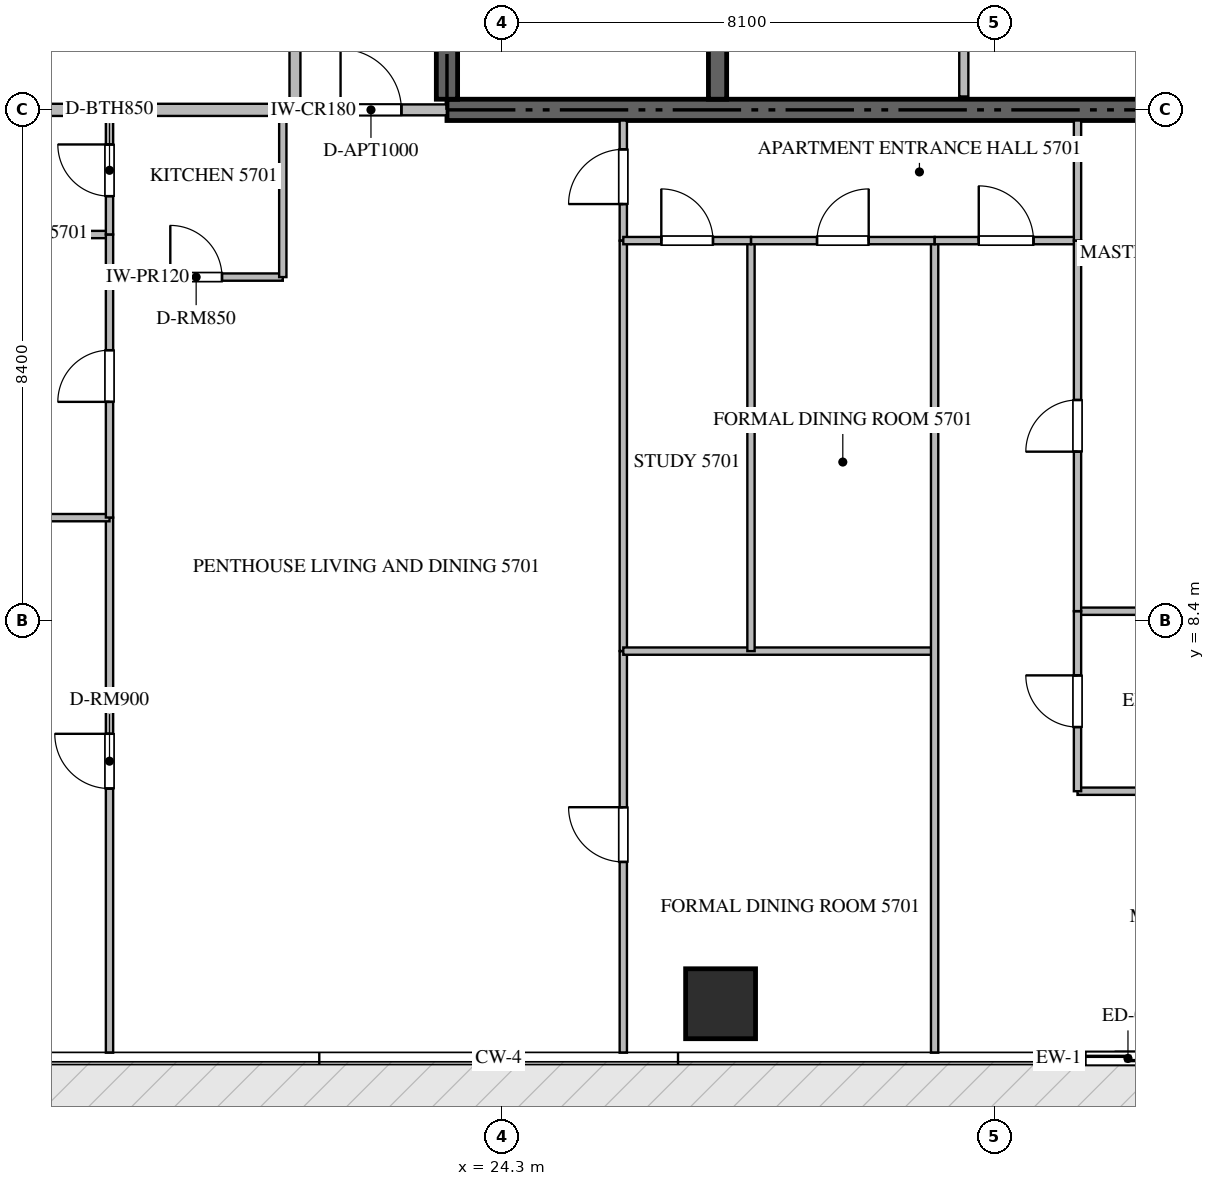
"""IFC4 building model, lengths in metres.
Left out: names, types, materials, properties, quantities, classifications, styles, units other than length and angle.
Written with IfcOpenShell. Run it as: python <this file> out.ifc"""

import sys

from ifc_helpers import new_model, si_unit, direction, frame, frame_2d, origin, origin_2d, place, context, subcontext, project, spatial, rectangle, extrude, source, transform, mapped, element, fill, save


model = new_model("IFC4")
c1 = context("Model", 3, precision=1e-05, world=origin(), true_north=direction((0.0, 1.0)))
c2 = subcontext(c1, "Body", "Model", "MODEL_VIEW")
j1 = project(units=[si_unit("LENGTHUNIT", "METRE"), si_unit("PLANEANGLEUNIT", "RADIAN")], contexts=[c1])
p1 = place(None, origin())
s1 = spatial("IfcSite", under=j1, at=p1, CompositionType="ELEMENT")
p2 = place(p1, origin())
s2 = spatial("IfcBuilding", under=s1, at=p2, CompositionType="ELEMENT")
p3 = place(p2, frame((0.0, 0.0, 229.7)))
s3 = spatial("IfcBuildingStorey", under=s2, at=p3, CompositionType="ELEMENT", Elevation=229.7)
p4 = place(p3, frame((23.4, 16.8, -0.26), z_axis=(0.0, 0.0, 1.0), x_axis=(1.0, 0.0, 0.0)))
e1 = element("IfcWall", 1, at=p4, inside=s3, PredefinedType="SHEAR", context=c2, shape_type="SweptSolid", body=[
    extrude(rectangle(XDim=18.0, YDim=0.35, at=frame_2d((9.0, 0.0))), origin(), (0.0, 0.0, 1.0), 3.848),
])
p5 = place(p3, frame((23.4, 16.975, -0.26), z_axis=(0.0, 0.0, 1.0), x_axis=(0.0, 1.0, 0.0)))
e2 = element("IfcWall", 2, at=p5, inside=s3, PredefinedType="SHEAR", context=c2, shape_type="SweptSolid", body=[
    extrude(rectangle(XDim=4.875, YDim=0.35, at=frame_2d((2.438, 0.0))), origin(), (0.0, 0.0, 1.0), 3.848),
])
p6 = place(p3, frame((27.85, 16.975, -0.26), z_axis=(0.0, 0.0, 1.0), x_axis=(0.0, 1.0, 0.0)))
e3 = element("IfcWall", 3, at=p6, inside=s3, PredefinedType="SHEAR", context=c2, shape_type="SweptSolid", body=[
    extrude(rectangle(XDim=4.875, YDim=0.3, at=frame_2d((2.438, 0.0))), origin(), (0.0, 0.0, 1.0), 3.848),
])
m1 = source(origin(), c2, "Body", "SweptSolid", [
    extrude(rectangle(XDim=1.15, YDim=1.15, at=origin_2d()), origin(), (0.0, 0.0, 1.0), 3.85),
])
p7 = place(p3, frame((27.9, 2.1, -0.26), z_axis=(0.0, 0.0, 1.0), x_axis=(1.0, 0.0, 0.0)))
e4 = element("IfcColumn", 4, at=p7, inside=s3, PredefinedType="COLUMN", context=c2, shape_type="MappedRepresentation", body=[
    mapped(m1, transform((0.0, 0.0, 0.0), scale=1.0)),
])
p8 = place(p3, frame((33.1, 1.2, 0.0), z_axis=(0.0, 0.0, 1.0), x_axis=(1.0, 0.0, 0.0)))
e5 = element("IfcWall", 5, at=p8, inside=s3, PredefinedType="ELEMENTEDWALL", context=c2, shape_type="SweptSolid", body=[
    extrude(rectangle(XDim=3.0, YDim=0.22, at=frame_2d((1.5, 0.0))), origin(), (0.0, 0.0, 1.0), 3.575),
])
p9 = place(p8, frame((0.8, 0.0, 0.0)))
e6 = element("IfcOpeningElement", 6, at=p9, cuts=e5, PredefinedType="OPENING", context=c2, shape_type="SweptSolid", body=[
    extrude(rectangle(XDim=1.4, YDim=2.25, at=frame_2d((0.7, 1.125))), frame((0.0, 0.12, 0.0), z_axis=(0.0, -1.0, 0.0), x_axis=(1.0, 0.0, 0.0)), (0.0, 0.0, 1.0), 0.24),
])
p10 = place(p3, frame((31.9, 17.02, 0.0), z_axis=(0.0, 0.0, 1.0), x_axis=(0.0, 1.0, 0.0)))
e7 = element("IfcWall", 7, at=p10, inside=s3, PredefinedType="PARTITIONING", context=c2, shape_type="SweptSolid", body=[
    extrude(rectangle(XDim=2.73, YDim=0.15, at=frame_2d((1.365, 0.0))), origin(), (0.0, 0.0, 1.0), 3.59),
])
p11 = place(p3, frame((7.482, 16.8, 0.0), z_axis=(0.0, 0.0, 1.0), x_axis=(1.0, 0.0, 0.0)))
e8 = element("IfcWall", 8, at=p11, inside=s3, PredefinedType="PARTITIONING", context=c2, shape_type="SweptSolid", body=[
    extrude(rectangle(XDim=13.418, YDim=0.2, at=frame_2d((6.709, 0.0))), origin(), (0.0, 0.0, 1.0), 3.59),
])
p12 = place(p3, frame((20.902, 16.8, 0.0), z_axis=(0.0, 0.0, 1.0), x_axis=(1.0, 0.0, 0.0)))
e9 = element("IfcWall", 9, at=p12, inside=s3, PredefinedType="PARTITIONING", context=c2, shape_type="SweptSolid", body=[
    extrude(rectangle(XDim=2.496, YDim=0.18, at=frame_2d((1.248, 0.0))), origin(), (0.0, 0.0, 1.0), 3.59),
])
p13 = place(p12, frame((0.748, 0.0, 0.0)))
e10 = element("IfcOpeningElement", 10, at=p13, cuts=e9, PredefinedType="OPENING", context=c2, shape_type="SweptSolid", body=[
    extrude(rectangle(XDim=1.0, YDim=2.15, at=frame_2d((0.5, 1.075))), frame((0.0, 0.1, 0.0), z_axis=(0.0, -1.0, 0.0), x_axis=(1.0, 0.0, 0.0)), (0.0, 0.0, 1.0), 0.2),
])
p14 = place(p3, frame((20.9, 16.8, 0.0), z_axis=(0.0, 0.0, 1.0), x_axis=(0.0, 1.0, 0.0)))
e11 = element("IfcWall", 11, at=p14, inside=s3, PredefinedType="PARTITIONING", context=c2, shape_type="SweptSolid", body=[
    extrude(rectangle(XDim=16.8, YDim=0.18, at=frame_2d((8.4, 0.0))), origin(), (0.0, 0.0, 1.0), 3.59),
])
p15 = place(p14, frame((2.465, 0.0, 0.0)))
e12 = element("IfcOpeningElement", 12, at=p15, cuts=e11, PredefinedType="OPENING", context=c2, shape_type="SweptSolid", body=[
    extrude(rectangle(XDim=1.0, YDim=2.15, at=frame_2d((0.5, 1.075))), frame((0.0, 0.1, 0.0), z_axis=(0.0, -1.0, 0.0), x_axis=(1.0, 0.0, 0.0)), (0.0, 0.0, 1.0), 0.2),
])
p16 = place(p14, frame((10.902, 0.0, 0.0)))
e13 = element("IfcOpeningElement", 13, at=p16, cuts=e11, PredefinedType="OPENING", context=c2, shape_type="SweptSolid", body=[
    extrude(rectangle(XDim=1.0, YDim=2.15, at=frame_2d((0.5, 1.075))), frame((0.0, 0.1, 0.0), z_axis=(0.0, -1.0, 0.0), x_axis=(1.0, 0.0, 0.0)), (0.0, 0.0, 1.0), 0.2),
])
p17 = place(p3, frame((17.85, 14.05, 0.0), z_axis=(0.0, 0.0, 1.0), x_axis=(1.0, 0.0, 0.0)))
e14 = element("IfcWall", 14, at=p17, inside=s3, PredefinedType="PARTITIONING", context=c2, shape_type="SweptSolid", body=[
    extrude(rectangle(XDim=2.85, YDim=0.12, at=frame_2d((1.425, 0.0))), origin(), (0.0, 0.0, 1.0), 3.59),
])
p18 = place(p17, frame((1.0, 0.0, 0.0)))
e15 = element("IfcOpeningElement", 15, at=p18, cuts=e14, PredefinedType="OPENING", context=c2, shape_type="SweptSolid", body=[
    extrude(rectangle(XDim=0.85, YDim=2.1, at=frame_2d((0.425, 1.05))), frame((0.0, 0.07, 0.0), z_axis=(0.0, -1.0, 0.0), x_axis=(1.0, 0.0, 0.0)), (0.0, 0.0, 1.0), 0.14),
])
p19 = place(p3, frame((20.7, 14.05, 0.0), z_axis=(0.0, 0.0, 1.0), x_axis=(0.0, 1.0, 0.0)))
e16 = element("IfcWall", 16, at=p19, inside=s3, PredefinedType="PARTITIONING", context=c2, shape_type="SweptSolid", body=[
    extrude(rectangle(XDim=2.81, YDim=0.12, at=frame_2d((1.405, 0.0))), origin(), (0.0, 0.0, 1.0), 3.59),
])
p20 = place(p3, frame((17.85, 1.295, 0.0), z_axis=(0.0, 0.0, 1.0), x_axis=(0.0, 1.0, 0.0)))
e17 = element("IfcWall", 17, at=p20, inside=s3, PredefinedType="PARTITIONING", context=c2, shape_type="SweptSolid", body=[
    extrude(rectangle(XDim=8.799, YDim=0.12, at=frame_2d((4.399, 0.0))), origin(), (0.0, 0.0, 1.0), 3.59),
])
p21 = place(p20, frame((4.344, 0.0, 0.0)))
e18 = element("IfcOpeningElement", 18, at=p21, cuts=e17, PredefinedType="OPENING", context=c2, shape_type="SweptSolid", body=[
    extrude(rectangle(XDim=0.9, YDim=2.1, at=frame_2d((0.45, 1.05))), frame((0.0, 0.07, 0.0), z_axis=(0.0, -1.0, 0.0), x_axis=(1.0, 0.0, 0.0)), (0.0, 0.0, 1.0), 0.14),
])
p22 = place(p3, frame((7.495, 10.094, 0.0), z_axis=(0.0, 0.0, 1.0), x_axis=(1.0, 0.0, 0.0)))
e19 = element("IfcWall", 19, at=p22, inside=s3, PredefinedType="PARTITIONING", context=c2, shape_type="SweptSolid", body=[
    extrude(rectangle(XDim=10.355, YDim=0.12, at=frame_2d((5.177, 0.0))), origin(), (0.0, 0.0, 1.0), 3.122),
])
p23 = place(p3, frame((14.65, 14.75, 0.0), z_axis=(0.0, 0.0, 1.0), x_axis=(1.0, 0.0, 0.0)))
e20 = element("IfcWall", 20, at=p23, inside=s3, PredefinedType="PARTITIONING", context=c2, shape_type="SweptSolid", body=[
    extrude(rectangle(XDim=3.2, YDim=0.12, at=frame_2d((1.6, 0.0))), origin(), (0.0, 0.0, 1.0), 3.59),
])
p24 = place(p3, frame((17.85, 10.096, 0.0), z_axis=(0.0, 0.0, 1.0), x_axis=(0.0, 1.0, 0.0)))
e21 = element("IfcWall", 21, at=p24, inside=s3, PredefinedType="PARTITIONING", context=c2, shape_type="SweptSolid", body=[
    extrude(rectangle(XDim=4.654, YDim=0.12, at=frame_2d((2.327, 0.0))), origin(), (0.0, 0.0, 1.0), 3.59),
])
p25 = place(p24, frame((1.902, 0.0, 0.0)))
e22 = element("IfcOpeningElement", 22, at=p25, cuts=e21, PredefinedType="OPENING", context=c2, shape_type="SweptSolid", body=[
    extrude(rectangle(XDim=0.85, YDim=2.1, at=frame_2d((0.425, 1.05))), frame((0.0, 0.07, 0.0), z_axis=(0.0, -1.0, 0.0), x_axis=(1.0, 0.0, 0.0)), (0.0, 0.0, 1.0), 0.14),
])
p26 = place(p3, frame((17.85, 14.752, 0.0), z_axis=(0.0, 0.0, 1.0), x_axis=(0.0, 1.0, 0.0)))
e23 = element("IfcWall", 23, at=p26, inside=s3, PredefinedType="PARTITIONING", context=c2, shape_type="SweptSolid", body=[
    extrude(rectangle(XDim=2.108, YDim=0.12, at=frame_2d((1.054, 0.0))), origin(), (0.0, 0.0, 1.0), 3.59),
])
p27 = place(p26, frame((0.629, 0.0, 0.0)))
e24 = element("IfcOpeningElement", 24, at=p27, cuts=e23, PredefinedType="OPENING", context=c2, shape_type="SweptSolid", body=[
    extrude(rectangle(XDim=0.85, YDim=2.1, at=frame_2d((0.425, 1.05))), frame((0.0, 0.07, 0.0), z_axis=(0.0, -1.0, 0.0), x_axis=(1.0, 0.0, 0.0)), (0.0, 0.0, 1.0), 0.14),
])
p28 = place(p3, frame((26.3, 14.65, 0.0), z_axis=(0.0, 0.0, 1.0), x_axis=(0.0, 1.0, 0.0)))
e25 = element("IfcWall", 25, at=p28, inside=s3, PredefinedType="PARTITIONING", context=c2, shape_type="SweptSolid", body=[
    extrude(rectangle(XDim=1.975, YDim=0.12, at=frame_2d((0.988, 0.0))), origin(), (0.0, 0.0, 1.0), 3.59),
])
p29 = place(p28, frame((0.601, 0.0, 0.0)))
e26 = element("IfcOpeningElement", 26, at=p29, cuts=e25, PredefinedType="OPENING", context=c2, shape_type="SweptSolid", body=[
    extrude(rectangle(XDim=0.9, YDim=2.1, at=frame_2d((0.45, 1.05))), frame((0.0, 0.07, 0.0), z_axis=(0.0, -1.0, 0.0), x_axis=(1.0, 0.0, 0.0)), (0.0, 0.0, 1.0), 0.14),
])
p30 = place(p3, frame((26.3, 1.295, 0.0), z_axis=(0.0, 0.0, 1.0), x_axis=(0.0, 1.0, 0.0)))
e27 = element("IfcWall", 27, at=p30, inside=s3, PredefinedType="PARTITIONING", context=c2, shape_type="SweptSolid", body=[
    extrude(rectangle(XDim=6.604, YDim=0.12, at=frame_2d((3.302, 0.0))), origin(), (0.0, 0.0, 1.0), 3.59),
])
p31 = place(p30, frame((3.137, 0.0, 0.0)))
e28 = element("IfcOpeningElement", 28, at=p31, cuts=e27, PredefinedType="OPENING", context=c2, shape_type="SweptSolid", body=[
    extrude(rectangle(XDim=0.9, YDim=2.1, at=frame_2d((0.45, 1.05))), frame((0.0, 0.07, 0.0), z_axis=(0.0, -1.0, 0.0), x_axis=(1.0, 0.0, 0.0)), (0.0, 0.0, 1.0), 0.14),
])
p32 = place(p3, frame((26.3, 7.901, 0.0), z_axis=(0.0, 0.0, 1.0), x_axis=(0.0, 1.0, 0.0)))
e29 = element("IfcWall", 29, at=p32, inside=s3, PredefinedType="PARTITIONING", context=c2, shape_type="SweptSolid", body=[
    extrude(rectangle(XDim=6.747, YDim=0.12, at=frame_2d((3.374, 0.0))), origin(), (0.0, 0.0, 1.0), 3.59),
])
p33 = place(p3, frame((26.3, 7.899, 0.0), z_axis=(0.0, 0.0, 1.0), x_axis=(1.0, 0.0, 0.0)))
e30 = element("IfcWall", 30, at=p33, inside=s3, PredefinedType="PARTITIONING", context=c2, shape_type="SweptSolid", body=[
    extrude(rectangle(XDim=5.12, YDim=0.12, at=frame_2d((2.56, 0.0))), origin(), (0.0, 0.0, 1.0), 3.59),
])
p34 = place(p3, frame((31.42, 1.295, 0.0), z_axis=(0.0, 0.0, 1.0), x_axis=(0.0, 1.0, 0.0)))
e31 = element("IfcWall", 31, at=p34, inside=s3, PredefinedType="PARTITIONING", context=c2, shape_type="SweptSolid", body=[
    extrude(rectangle(XDim=13.355, YDim=0.12, at=frame_2d((6.677, 0.0))), origin(), (0.0, 0.0, 1.0), 3.59),
])
p35 = place(p3, frame((28.4, 7.899, 0.0), z_axis=(0.0, 0.0, 1.0), x_axis=(0.0, 1.0, 0.0)))
e32 = element("IfcWall", 32, at=p35, inside=s3, PredefinedType="PARTITIONING", context=c2, shape_type="SweptSolid", body=[
    extrude(rectangle(XDim=6.751, YDim=0.12, at=frame_2d((3.375, 0.0))), origin(), (0.0, 0.0, 1.0), 3.59),
])
p36 = place(p3, frame((26.3, 14.65, 0.0), z_axis=(0.0, 0.0, 1.0), x_axis=(1.0, 0.0, 0.0)))
e33 = element("IfcWall", 33, at=p36, inside=s3, PredefinedType="PARTITIONING", context=c2, shape_type="SweptSolid", body=[
    extrude(rectangle(XDim=2.1, YDim=0.12, at=frame_2d((1.05, 0.0))), origin(), (0.0, 0.0, 1.0), 3.59),
])
p37 = place(p36, frame((0.625, 0.0, 0.0)))
e34 = element("IfcOpeningElement", 34, at=p37, cuts=e33, PredefinedType="OPENING", context=c2, shape_type="SweptSolid", body=[
    extrude(rectangle(XDim=0.85, YDim=2.1, at=frame_2d((0.425, 1.05))), frame((0.0, 0.07, 0.0), z_axis=(0.0, -1.0, 0.0), x_axis=(1.0, 0.0, 0.0)), (0.0, 0.0, 1.0), 0.14),
])
p38 = place(p3, frame((28.402, 14.65, 0.0), z_axis=(0.0, 0.0, 1.0), x_axis=(1.0, 0.0, 0.0)))
e35 = element("IfcWall", 35, at=p38, inside=s3, PredefinedType="PARTITIONING", context=c2, shape_type="SweptSolid", body=[
    extrude(rectangle(XDim=3.018, YDim=0.12, at=frame_2d((1.509, 0.0))), origin(), (0.0, 0.0, 1.0), 3.59),
])
p39 = place(p38, frame((1.084, 0.0, 0.0)))
e36 = element("IfcOpeningElement", 36, at=p39, cuts=e35, PredefinedType="OPENING", context=c2, shape_type="SweptSolid", body=[
    extrude(rectangle(XDim=0.85, YDim=2.1, at=frame_2d((0.425, 1.05))), frame((0.0, 0.07, 0.0), z_axis=(0.0, -1.0, 0.0), x_axis=(1.0, 0.0, 0.0)), (0.0, 0.0, 1.0), 0.14),
])
p40 = place(p3, frame((31.422, 14.65, 0.0), z_axis=(0.0, 0.0, 1.0), x_axis=(1.0, 0.0, 0.0)))
e37 = element("IfcWall", 37, at=p40, inside=s3, PredefinedType="PARTITIONING", context=c2, shape_type="SweptSolid", body=[
    extrude(rectangle(XDim=2.348, YDim=0.12, at=frame_2d((1.174, 0.0))), origin(), (0.0, 0.0, 1.0), 3.59),
])
p41 = place(p40, frame((0.724, 0.0, 0.0)))
e38 = element("IfcOpeningElement", 38, at=p41, cuts=e37, PredefinedType="OPENING", context=c2, shape_type="SweptSolid", body=[
    extrude(rectangle(XDim=0.9, YDim=2.1, at=frame_2d((0.45, 1.05))), frame((0.0, 0.07, 0.0), z_axis=(0.0, -1.0, 0.0), x_axis=(1.0, 0.0, 0.0)), (0.0, 0.0, 1.0), 0.14),
])
for number, where, z_axis, x_axis in (
    (39, (33.77, 5.595, 0.0), (0.0, 0.0, 1.0), (1.0, 0.0, 0.0)),
    (40, (33.77, 8.555, 0.0), (0.0, 0.0, 1.0), (1.0, 0.0, 0.0)),
):
    element("IfcWall", number, at=place(p3, frame(where, z_axis=z_axis, x_axis=x_axis)), inside=s3, PredefinedType="PARTITIONING", context=c2, shape_type="SweptSolid", body=[
        extrude(rectangle(XDim=4.79, YDim=0.12, at=frame_2d((2.395, 0.0))), origin(), (0.0, 0.0, 1.0), 3.59),
    ])
p42 = place(p3, frame((33.77, 5.595, 0.0), z_axis=(0.0, 0.0, 1.0), x_axis=(0.0, 1.0, 0.0)))
e41 = element("IfcWall", 41, at=p42, inside=s3, PredefinedType="PARTITIONING", context=c2, shape_type="SweptSolid", body=[
    extrude(rectangle(XDim=2.96, YDim=0.12, at=frame_2d((1.48, 0.0))), origin(), (0.0, 0.0, 1.0), 3.59),
])
p43 = place(p42, frame((1.055, 0.0, 0.0)))
e42 = element("IfcOpeningElement", 42, at=p43, cuts=e41, PredefinedType="OPENING", context=c2, shape_type="SweptSolid", body=[
    extrude(rectangle(XDim=0.85, YDim=2.1, at=frame_2d((0.425, 1.05))), frame((0.0, 0.07, 0.0), z_axis=(0.0, -1.0, 0.0), x_axis=(1.0, 0.0, 0.0)), (0.0, 0.0, 1.0), 0.14),
])
p44 = place(p3, frame((33.77, 8.557, 0.0), z_axis=(0.0, 0.0, 1.0), x_axis=(0.0, 1.0, 0.0)))
e43 = element("IfcWall", 43, at=p44, inside=s3, PredefinedType="PARTITIONING", context=c2, shape_type="SweptSolid", body=[
    extrude(rectangle(XDim=6.093, YDim=0.12, at=frame_2d((3.046, 0.0))), origin(), (0.0, 0.0, 1.0), 3.59),
])
p45 = place(p44, frame((2.622, 0.0, 0.0)))
e44 = element("IfcOpeningElement", 44, at=p45, cuts=e43, PredefinedType="OPENING", context=c2, shape_type="SweptSolid", body=[
    extrude(rectangle(XDim=0.85, YDim=2.1, at=frame_2d((0.425, 1.05))), frame((0.0, 0.07, 0.0), z_axis=(0.0, -1.0, 0.0), x_axis=(1.0, 0.0, 0.0)), (0.0, 0.0, 1.0), 0.14),
])
p46 = place(p3, frame((33.77, 14.652, 0.0), z_axis=(0.0, 0.0, 1.0), x_axis=(0.0, 1.0, 0.0)))
e45 = element("IfcWall", 45, at=p46, inside=s3, PredefinedType="PARTITIONING", context=c2, shape_type="SweptSolid", body=[
    extrude(rectangle(XDim=1.973, YDim=0.12, at=frame_2d((0.986, 0.0))), origin(), (0.0, 0.0, 1.0), 3.59),
])
m2 = source(origin(), c2, "Body", "SweptSolid", [
    extrude(rectangle(XDim=1.4, YDim=2.25, at=frame_2d((0.7, 1.125))), frame((0.0, 0.025, 0.0), z_axis=(0.0, -1.0, 0.0), x_axis=(1.0, 0.0, 0.0)), (0.0, 0.0, 1.0), 0.05),
])
p47 = place(p9, origin())
e46 = element("IfcDoor", 46, at=p47, inside=s3, OperationType="SLIDING_TO_LEFT", PredefinedType="DOOR", context=c2, shape_type="MappedRepresentation", body=[
    mapped(m2, transform((0.0, 0.0, 0.0), scale=1.0)),
])
fill(e6, e46)
m3 = source(origin(), c2, "Body", "SweptSolid", [
    extrude(rectangle(XDim=1.0, YDim=2.15, at=frame_2d((0.5, 1.075))), frame((0.0, 0.025, 0.0), z_axis=(0.0, -1.0, 0.0), x_axis=(1.0, 0.0, 0.0)), (0.0, 0.0, 1.0), 0.05),
])
p48 = place(p13, origin())
e47 = element("IfcDoor", 47, at=p48, inside=s3, OperationType="SINGLE_SWING_LEFT", PredefinedType="DOOR", context=c2, shape_type="MappedRepresentation", body=[
    mapped(m3, transform((0.0, 0.0, 0.0), scale=1.0)),
])
fill(e10, e47)
m4 = source(origin(), c2, "Body", "SweptSolid", [
    extrude(rectangle(XDim=0.85, YDim=2.1, at=frame_2d((0.425, 1.05))), frame((0.0, 0.025, 0.0), z_axis=(0.0, -1.0, 0.0), x_axis=(1.0, 0.0, 0.0)), (0.0, 0.0, 1.0), 0.05),
])
p49 = place(p18, origin())
e48 = element("IfcDoor", 48, at=p49, inside=s3, OperationType="SINGLE_SWING_LEFT", PredefinedType="DOOR", context=c2, shape_type="MappedRepresentation", body=[
    mapped(m4, transform((0.0, 0.0, 0.0), scale=1.0)),
])
fill(e15, e48)
m5 = source(origin(), c2, "Body", "SweptSolid", [
    extrude(rectangle(XDim=0.9, YDim=2.1, at=frame_2d((0.45, 1.05))), frame((0.0, 0.025, 0.0), z_axis=(0.0, -1.0, 0.0), x_axis=(1.0, 0.0, 0.0)), (0.0, 0.0, 1.0), 0.05),
])
p50 = place(p21, origin())
e49 = element("IfcDoor", 49, at=p50, inside=s3, OperationType="SINGLE_SWING_RIGHT", PredefinedType="DOOR", context=c2, shape_type="MappedRepresentation", body=[
    mapped(m5, transform((0.0, 0.0, 0.0), scale=1.0)),
])
fill(e18, e49)
p51 = place(p25, origin())
e50 = element("IfcDoor", 50, at=p51, inside=s3, OperationType="SINGLE_SWING_LEFT", PredefinedType="DOOR", context=c2, shape_type="MappedRepresentation", body=[
    mapped(m4, transform((0.0, 0.0, 0.0), scale=1.0)),
])
fill(e22, e50)
p52 = place(p27, origin())
e51 = element("IfcDoor", 51, at=p52, inside=s3, OperationType="SINGLE_SWING_RIGHT", PredefinedType="DOOR", context=c2, shape_type="MappedRepresentation", body=[
    mapped(m4, transform((0.0, 0.0, 0.0), scale=1.0)),
])
fill(e24, e51)
p53 = place(p29, origin())
e52 = element("IfcDoor", 52, at=p53, inside=s3, OperationType="SINGLE_SWING_LEFT", PredefinedType="DOOR", context=c2, shape_type="MappedRepresentation", body=[
    mapped(m5, transform((0.0, 0.0, 0.0), scale=1.0)),
])
fill(e26, e52)
p54 = place(p31, origin())
e53 = element("IfcDoor", 53, at=p54, inside=s3, OperationType="SINGLE_SWING_RIGHT", PredefinedType="DOOR", context=c2, shape_type="MappedRepresentation", body=[
    mapped(m5, transform((0.0, 0.0, 0.0), scale=1.0)),
])
fill(e28, e53)
p55 = place(p37, origin())
e54 = element("IfcDoor", 54, at=p55, inside=s3, OperationType="SINGLE_SWING_LEFT", PredefinedType="DOOR", context=c2, shape_type="MappedRepresentation", body=[
    mapped(m4, transform((0.0, 0.0, 0.0), scale=1.0)),
])
fill(e34, e54)
p56 = place(p39, origin())
e55 = element("IfcDoor", 55, at=p56, inside=s3, OperationType="SINGLE_SWING_RIGHT", PredefinedType="DOOR", context=c2, shape_type="MappedRepresentation", body=[
    mapped(m4, transform((0.0, 0.0, 0.0), scale=1.0)),
])
fill(e36, e55)
p57 = place(p41, origin())
e56 = element("IfcDoor", 56, at=p57, inside=s3, OperationType="SINGLE_SWING_LEFT", PredefinedType="DOOR", context=c2, shape_type="MappedRepresentation", body=[
    mapped(m5, transform((0.0, 0.0, 0.0), scale=1.0)),
])
fill(e38, e56)
p58 = place(p43, origin())
e57 = element("IfcDoor", 57, at=p58, inside=s3, OperationType="SINGLE_SWING_RIGHT", PredefinedType="DOOR", context=c2, shape_type="MappedRepresentation", body=[
    mapped(m4, transform((0.0, 0.0, 0.0), scale=1.0)),
])
fill(e42, e57)
p59 = place(p45, origin())
e58 = element("IfcDoor", 58, at=p59, inside=s3, OperationType="SINGLE_SWING_LEFT", PredefinedType="DOOR", context=c2, shape_type="MappedRepresentation", body=[
    mapped(m4, transform((0.0, 0.0, 0.0), scale=1.0)),
])
fill(e44, e58)
save(model, sys.argv[1])
